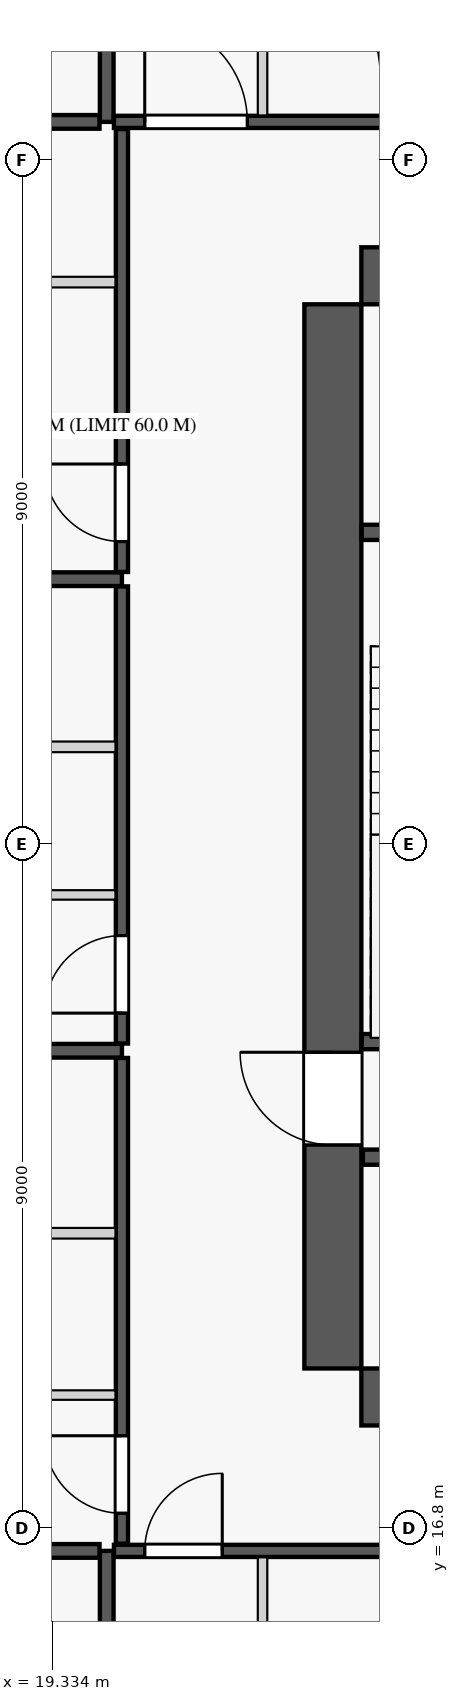
"""IFC4 building model, lengths in metres.
Left out: names, types, materials, properties, quantities, classifications, styles, units other than length and angle.
Written with IfcOpenShell. Run it as: python <this file> out.ifc"""

import sys

from ifc_helpers import new_model, si_unit, direction, frame, frame_2d, origin, origin_2d, place, context, subcontext, project, spatial, rectangle, extrude, element, fill, save


model = new_model("IFC4")
c1 = context("Model", 3, precision=1e-05, world=origin(), true_north=direction((0.0, 1.0)))
c2 = subcontext(c1, "Body", "Model", "MODEL_VIEW")
j1 = project(units=[si_unit("LENGTHUNIT", "METRE"), si_unit("PLANEANGLEUNIT", "RADIAN")], contexts=[c1])
p1 = place(None, origin())
s1 = spatial("IfcSite", under=j1, at=p1, CompositionType="ELEMENT")
p2 = place(p1, origin())
s2 = spatial("IfcBuilding", under=s1, at=p2, CompositionType="ELEMENT")
p3 = place(p2, frame((0.0, 0.0, 112.6)))
s3 = spatial("IfcBuildingStorey", under=s2, at=p3, CompositionType="ELEMENT", Elevation=112.6)
for number, where, z_axis, x_axis in (
    (1, (23.025, 18.525, 0.0), (0.0, 0.0, 1.0), (1.0, 0.0, 0.0)),
    (2, (23.025, 33.275, 0.0), (0.0, 0.0, 1.0), (1.0, 0.0, 0.0)),
):
    element("IfcColumn", number, at=place(p3, frame(where, z_axis=z_axis, x_axis=x_axis)), inside=s3, PredefinedType="COLUMN", context=c2, shape_type="SweptSolid", body=[
        extrude(rectangle(XDim=0.75, YDim=0.75, at=origin_2d()), origin(), (0.0, 0.0, 1.0), 3.55),
    ])
for number, where, z_axis, x_axis in (
    (3, (23.4, 18.525, 0.0), (0.0, 0.0, 1.0), (1.0, 0.0, 0.0)),
    (4, (23.4, 33.275, 0.0), (0.0, 0.0, 1.0), (1.0, 0.0, 0.0)),
):
    element("IfcWall", number, at=place(p3, frame(where, z_axis=z_axis, x_axis=x_axis)), inside=s3, PredefinedType="SHEAR", context=c2, shape_type="SweptSolid", body=[
        extrude(rectangle(XDim=18.0, YDim=0.75, at=frame_2d((9.0, 0.0))), origin(), (0.0, 0.0, 1.0), 3.34),
    ])
p4 = place(p3, frame((23.025, 18.9, 0.0), z_axis=(0.0, 0.0, 1.0), x_axis=(0.0, 1.0, 0.0)))
e5 = element("IfcWall", 5, at=p4, inside=s3, PredefinedType="SHEAR", context=c2, shape_type="SweptSolid", body=[
    extrude(rectangle(XDim=14.0, YDim=0.75, at=frame_2d((7.0, 0.0))), origin(), (0.0, 0.0, 1.0), 3.34),
])
p5 = place(p4, frame((2.94, 0.0, 0.0)))
e6 = element("IfcOpeningElement", 6, at=p5, cuts=e5, PredefinedType="OPENING", context=c2, shape_type="SweptSolid", body=[
    extrude(rectangle(XDim=1.22, YDim=2.25, at=frame_2d((0.61, 1.125))), frame((0.0, 0.385, 0.0), z_axis=(0.0, -1.0, 0.0), x_axis=(1.0, 0.0, 0.0)), (0.0, 0.0, 1.0), 0.77),
])
p6 = place(p3, frame((23.405, 23.2, 0.0), z_axis=(0.0, 0.0, 1.0), x_axis=(1.0, 0.0, 0.0)))
e7 = element("IfcWall", 7, at=p6, inside=s3, PredefinedType="PLUMBINGWALL", context=c2, shape_type="SweptSolid", body=[
    extrude(rectangle(XDim=3.27, YDim=0.2, at=frame_2d((1.635, 0.0))), origin(), (0.0, 0.0, 1.0), 3.34),
])
p7 = place(p3, frame((23.405, 29.9, 0.0), z_axis=(0.0, 0.0, 1.0), x_axis=(1.0, 0.0, 0.0)))
e8 = element("IfcWall", 8, at=p7, inside=s3, PredefinedType="PLUMBINGWALL", context=c2, shape_type="SweptSolid", body=[
    extrude(rectangle(XDim=3.27, YDim=0.2, at=frame_2d((1.635, 0.0))), origin(), (0.0, 0.0, 1.0), 3.34),
])
p8 = place(p7, frame((1.85, 0.0, 0.0)))
e9 = element("IfcOpeningElement", 9, at=p8, cuts=e8, PredefinedType="OPENING", context=c2, shape_type="SweptSolid", body=[
    extrude(rectangle(XDim=0.85, YDim=2.05, at=frame_2d((0.425, 1.025))), frame((0.0, 0.11, 0.0), z_axis=(0.0, -1.0, 0.0), x_axis=(1.0, 0.0, 0.0)), (0.0, 0.0, 1.0), 0.22),
])
p9 = place(p3, frame((23.42, 21.68, 0.0), z_axis=(0.0, 0.0, 1.0), x_axis=(1.0, 0.0, 0.0)))
e10 = element("IfcWall", 10, at=p9, inside=s3, PredefinedType="PLUMBINGWALL", context=c2, shape_type="SweptSolid", body=[
    extrude(rectangle(XDim=17.96, YDim=0.2, at=frame_2d((8.98, 0.0))), origin(), (0.0, 0.0, 1.0), 3.34),
])
p10 = place(p9, frame((11.6, 0.0, 0.0)))
e11 = element("IfcOpeningElement", 11, at=p10, cuts=e10, PredefinedType="OPENING", context=c2, shape_type="SweptSolid", body=[
    extrude(rectangle(XDim=1.1, YDim=2.2, at=frame_2d((0.55, 1.1))), frame((0.0, 0.11, 0.0), z_axis=(0.0, -1.0, 0.0), x_axis=(1.0, 0.0, 0.0)), (0.0, 0.0, 1.0), 0.22),
])
p11 = place(p9, frame((0.41, 0.0, 0.0)))
e12 = element("IfcOpeningElement", 12, at=p11, cuts=e10, PredefinedType="OPENING", context=c2, shape_type="SweptSolid", body=[
    extrude(rectangle(XDim=0.85, YDim=2.05, at=frame_2d((0.425, 1.025))), frame((0.0, 0.11, 0.0), z_axis=(0.0, -1.0, 0.0), x_axis=(1.0, 0.0, 0.0)), (0.0, 0.0, 1.0), 0.22),
])
p12 = place(p9, frame((13.78, 0.0, 0.0)))
e13 = element("IfcOpeningElement", 13, at=p12, cuts=e10, PredefinedType="OPENING", context=c2, shape_type="SweptSolid", body=[
    extrude(rectangle(XDim=0.85, YDim=2.05, at=frame_2d((0.425, 1.025))), frame((0.0, 0.11, 0.0), z_axis=(0.0, -1.0, 0.0), x_axis=(1.0, 0.0, 0.0)), (0.0, 0.0, 1.0), 0.22),
])
p13 = place(p9, frame((16.13, 0.0, 0.0)))
e14 = element("IfcOpeningElement", 14, at=p13, cuts=e10, PredefinedType="OPENING", context=c2, shape_type="SweptSolid", body=[
    extrude(rectangle(XDim=0.85, YDim=2.05, at=frame_2d((0.425, 1.025))), frame((0.0, 0.11, 0.0), z_axis=(0.0, -1.0, 0.0), x_axis=(1.0, 0.0, 0.0)), (0.0, 0.0, 1.0), 0.22),
])
p14 = place(p3, frame((20.05, 4.105, 0.0), z_axis=(0.0, 0.0, 1.0), x_axis=(0.0, 1.0, 0.0)))
e15 = element("IfcWall", 15, at=p14, inside=s3, PredefinedType="PARTITIONING", context=c2, shape_type="SweptSolid", body=[
    extrude(rectangle(XDim=12.395, YDim=0.18, at=frame_2d((6.198, 0.0))), origin(), (0.0, 0.0, 1.0), 3.34),
])
p15 = place(p3, frame((20.145, 16.5, 0.0), z_axis=(0.0, 0.0, 1.0), x_axis=(1.0, 0.0, 0.0)))
e16 = element("IfcWall", 16, at=p15, inside=s3, PredefinedType="PARTITIONING", context=c2, shape_type="SweptSolid", body=[
    extrude(rectangle(XDim=8.328, YDim=0.16, at=frame_2d((4.164, 0.0))), origin(), (0.0, 0.0, 1.0), 3.34),
])
p16 = place(p15, frame((0.405, 0.0, 0.0)))
e17 = element("IfcOpeningElement", 17, at=p16, cuts=e16, PredefinedType="OPENING", context=c2, shape_type="SweptSolid", body=[
    extrude(rectangle(XDim=1.02, YDim=2.25, at=frame_2d((0.51, 1.125))), frame((0.0, 0.09, 0.0), z_axis=(0.0, -1.0, 0.0), x_axis=(1.0, 0.0, 0.0)), (0.0, 0.0, 1.0), 0.18),
])
p17 = place(p3, frame((22.1, 12.391, 0.0), z_axis=(0.0, 0.0, 1.0), x_axis=(0.0, 1.0, 0.0)))
e18 = element("IfcWall", 18, at=p17, inside=s3, PredefinedType="PARTITIONING", context=c2, shape_type="SweptSolid", body=[
    extrude(rectangle(XDim=4.024, YDim=0.125, at=frame_2d((2.012, 0.0))), origin(), (0.0, 0.0, 1.0), 2.722),
])
p18 = place(p3, frame((20.05, 35.3, 0.0), z_axis=(0.0, 0.0, 1.0), x_axis=(0.0, 1.0, 0.0)))
e19 = element("IfcWall", 19, at=p18, inside=s3, PredefinedType="PARTITIONING", context=c2, shape_type="SweptSolid", body=[
    extrude(rectangle(XDim=12.195, YDim=0.18, at=frame_2d((6.098, 0.0))), origin(), (0.0, 0.0, 1.0), 3.34),
])
p19 = place(p3, frame((20.145, 35.3, 0.0), z_axis=(0.0, 0.0, 1.0), x_axis=(1.0, 0.0, 0.0)))
e20 = element("IfcWall", 20, at=p19, inside=s3, PredefinedType="PARTITIONING", context=c2, shape_type="SweptSolid", body=[
    extrude(rectangle(XDim=24.51, YDim=0.16, at=frame_2d((12.255, 0.0))), origin(), (0.0, 0.0, 1.0), 3.34),
])
p20 = place(p19, frame((0.405, 0.0, 0.0)))
e21 = element("IfcOpeningElement", 21, at=p20, cuts=e20, PredefinedType="OPENING", context=c2, shape_type="SweptSolid", body=[
    extrude(rectangle(XDim=1.35, YDim=2.35, at=frame_2d((0.675, 1.175))), frame((0.0, 0.09, 0.0), z_axis=(0.0, -1.0, 0.0), x_axis=(1.0, 0.0, 0.0)), (0.0, 0.0, 1.0), 0.18),
])
p21 = place(p3, frame((22.1, 35.385, 0.0), z_axis=(0.0, 0.0, 1.0), x_axis=(0.0, 1.0, 0.0)))
e22 = element("IfcWall", 22, at=p21, inside=s3, PredefinedType="PARTITIONING", context=c2, shape_type="SweptSolid", body=[
    extrude(rectangle(XDim=6.395, YDim=0.125, at=frame_2d((3.198, 0.0))), origin(), (0.0, 0.0, 1.0), 2.722),
])
p22 = place(p3, frame((12.185, 16.5, 0.0), z_axis=(0.0, 0.0, 1.0), x_axis=(1.0, 0.0, 0.0)))
e23 = element("IfcWall", 23, at=p22, inside=s3, PredefinedType="PARTITIONING", context=c2, shape_type="SweptSolid", body=[
    extrude(rectangle(XDim=7.77, YDim=0.18, at=frame_2d((3.885, 0.0))), origin(), (0.0, 0.0, 1.0), 3.34),
])
p23 = place(p3, frame((12.286, 35.3, 0.0), z_axis=(0.0, 0.0, 1.0), x_axis=(1.0, 0.0, 0.0)))
e24 = element("IfcWall", 24, at=p23, inside=s3, PredefinedType="PARTITIONING", context=c2, shape_type="SweptSolid", body=[
    extrude(rectangle(XDim=7.669, YDim=0.18, at=frame_2d((3.834, 0.0))), origin(), (0.0, 0.0, 1.0), 3.34),
])
p24 = place(p3, frame((20.25, 16.595, 0.0), z_axis=(0.0, 0.0, 1.0), x_axis=(0.0, 1.0, 0.0)))
e25 = element("IfcWall", 25, at=p24, inside=s3, PredefinedType="PARTITIONING", context=c2, shape_type="SweptSolid", body=[
    extrude(rectangle(XDim=6.39, YDim=0.16, at=frame_2d((3.195, 0.0))), origin(), (0.0, 0.0, 1.0), 3.34),
])
p25 = place(p24, frame((0.4, 0.0, 0.0)))
e26 = element("IfcOpeningElement", 26, at=p25, cuts=e25, PredefinedType="OPENING", context=c2, shape_type="SweptSolid", body=[
    extrude(rectangle(XDim=1.02, YDim=2.25, at=frame_2d((0.51, 1.125))), frame((0.0, 0.09, 0.0), z_axis=(0.0, -1.0, 0.0), x_axis=(1.0, 0.0, 0.0)), (0.0, 0.0, 1.0), 0.18),
])
p26 = place(p3, frame((17.685, 18.55, 0.0), z_axis=(0.0, 0.0, 1.0), x_axis=(1.0, 0.0, 0.0)))
e27 = element("IfcWall", 27, at=p26, inside=s3, PredefinedType="PARTITIONING", context=c2, shape_type="SweptSolid", body=[
    extrude(rectangle(XDim=2.48, YDim=0.125, at=frame_2d((1.24, 0.0))), origin(), (0.0, 0.0, 1.0), 2.722),
])
p27 = place(p3, frame((17.685, 20.679, 0.0), z_axis=(0.0, 0.0, 1.0), x_axis=(1.0, 0.0, 0.0)))
e28 = element("IfcWall", 28, at=p27, inside=s3, PredefinedType="PLUMBINGWALL", context=c2, shape_type="SweptSolid", body=[
    extrude(rectangle(XDim=2.48, YDim=0.14, at=frame_2d((1.24, 0.0))), origin(), (0.0, 0.0, 1.0), 3.34),
])
p28 = place(p3, frame((8.856, 23.08, 0.0), z_axis=(0.0, 0.0, 1.0), x_axis=(1.0, 0.0, 0.0)))
e29 = element("IfcWall", 29, at=p28, inside=s3, PredefinedType="PARTITIONING", context=c2, shape_type="SweptSolid", body=[
    extrude(rectangle(XDim=11.394, YDim=0.18, at=frame_2d((5.697, 0.0))), origin(), (0.0, 0.0, 1.0), 3.34),
])
p29 = place(p3, frame((20.25, 23.175, 0.0), z_axis=(0.0, 0.0, 1.0), x_axis=(0.0, 1.0, 0.0)))
e30 = element("IfcWall", 30, at=p29, inside=s3, PredefinedType="PARTITIONING", context=c2, shape_type="SweptSolid", body=[
    extrude(rectangle(XDim=6.014, YDim=0.16, at=frame_2d((3.007, 0.0))), origin(), (0.0, 0.0, 1.0), 3.34),
])
p30 = place(p29, frame((0.4, 0.0, 0.0)))
e31 = element("IfcOpeningElement", 31, at=p30, cuts=e30, PredefinedType="OPENING", context=c2, shape_type="SweptSolid", body=[
    extrude(rectangle(XDim=1.02, YDim=2.25, at=frame_2d((0.51, 1.125))), frame((0.0, 0.09, 0.0), z_axis=(0.0, -1.0, 0.0), x_axis=(1.0, 0.0, 0.0)), (0.0, 0.0, 1.0), 0.18),
])
p31 = place(p3, frame((17.685, 25.13, 0.0), z_axis=(0.0, 0.0, 1.0), x_axis=(1.0, 0.0, 0.0)))
e32 = element("IfcWall", 32, at=p31, inside=s3, PredefinedType="PARTITIONING", context=c2, shape_type="SweptSolid", body=[
    extrude(rectangle(XDim=2.48, YDim=0.125, at=frame_2d((1.24, 0.0))), origin(), (0.0, 0.0, 1.0), 3.34),
])
p32 = place(p3, frame((17.685, 27.078, 0.0), z_axis=(0.0, 0.0, 1.0), x_axis=(1.0, 0.0, 0.0)))
e33 = element("IfcWall", 33, at=p32, inside=s3, PredefinedType="PLUMBINGWALL", context=c2, shape_type="SweptSolid", body=[
    extrude(rectangle(XDim=2.48, YDim=0.14, at=frame_2d((1.24, 0.0))), origin(), (0.0, 0.0, 1.0), 3.34),
])
p33 = place(p3, frame((9.242, 29.284, 0.0), z_axis=(0.0, 0.0, 1.0), x_axis=(1.0, 0.0, 0.0)))
e34 = element("IfcWall", 34, at=p33, inside=s3, PredefinedType="PARTITIONING", context=c2, shape_type="SweptSolid", body=[
    extrude(rectangle(XDim=11.008, YDim=0.18, at=frame_2d((5.504, 0.0))), origin(), (0.0, 0.0, 1.0), 3.34),
])
p34 = place(p3, frame((20.25, 29.379, 0.0), z_axis=(0.0, 0.0, 1.0), x_axis=(0.0, 1.0, 0.0)))
e35 = element("IfcWall", 35, at=p34, inside=s3, PredefinedType="PARTITIONING", context=c2, shape_type="SweptSolid", body=[
    extrude(rectangle(XDim=5.826, YDim=0.16, at=frame_2d((2.913, 0.0))), origin(), (0.0, 0.0, 1.0), 3.34),
])
p35 = place(p34, frame((0.4, 0.0, 0.0)))
e36 = element("IfcOpeningElement", 36, at=p35, cuts=e35, PredefinedType="OPENING", context=c2, shape_type="SweptSolid", body=[
    extrude(rectangle(XDim=1.02, YDim=2.25, at=frame_2d((0.51, 1.125))), frame((0.0, 0.09, 0.0), z_axis=(0.0, -1.0, 0.0), x_axis=(1.0, 0.0, 0.0)), (0.0, 0.0, 1.0), 0.18),
])
p36 = place(p3, frame((17.685, 31.334, 0.0), z_axis=(0.0, 0.0, 1.0), x_axis=(1.0, 0.0, 0.0)))
e37 = element("IfcWall", 37, at=p36, inside=s3, PredefinedType="PARTITIONING", context=c2, shape_type="SweptSolid", body=[
    extrude(rectangle(XDim=2.48, YDim=0.125, at=frame_2d((1.24, 0.0))), origin(), (0.0, 0.0, 1.0), 3.34),
])
p37 = place(p3, frame((17.685, 33.192, 0.0), z_axis=(0.0, 0.0, 1.0), x_axis=(1.0, 0.0, 0.0)))
e38 = element("IfcWall", 38, at=p37, inside=s3, PredefinedType="PLUMBINGWALL", context=c2, shape_type="SweptSolid", body=[
    extrude(rectangle(XDim=2.48, YDim=0.14, at=frame_2d((1.24, 0.0))), origin(), (0.0, 0.0, 1.0), 2.722),
])
p38 = place(p5, origin())
e39 = element("IfcDoor", 39, at=p38, inside=s3, OperationType="SINGLE_SWING_RIGHT", PredefinedType="DOOR", context=c2, shape_type="SweptSolid", body=[
    extrude(rectangle(XDim=1.22, YDim=2.25, at=frame_2d((0.61, 1.125))), frame((0.0, 0.025, 0.0), z_axis=(0.0, -1.0, 0.0), x_axis=(1.0, 0.0, 0.0)), (0.0, 0.0, 1.0), 0.05),
])
fill(e6, e39)
p39 = place(p16, origin())
e40 = element("IfcDoor", 40, at=p39, inside=s3, OperationType="SINGLE_SWING_RIGHT", PredefinedType="DOOR", context=c2, shape_type="SweptSolid", body=[
    extrude(rectangle(XDim=1.02, YDim=2.25, at=frame_2d((0.51, 1.125))), frame((0.0, 0.025, 0.0), z_axis=(0.0, -1.0, 0.0), x_axis=(1.0, 0.0, 0.0)), (0.0, 0.0, 1.0), 0.05),
])
fill(e17, e40)
p40 = place(p20, origin())
e41 = element("IfcDoor", 41, at=p40, inside=s3, OperationType="SINGLE_SWING_LEFT", PredefinedType="DOOR", context=c2, shape_type="SweptSolid", body=[
    extrude(rectangle(XDim=1.35, YDim=2.35, at=frame_2d((0.675, 1.175))), frame((0.0, 0.025, 0.0), z_axis=(0.0, -1.0, 0.0), x_axis=(1.0, 0.0, 0.0)), (0.0, 0.0, 1.0), 0.05),
])
fill(e21, e41)
p41 = place(p25, origin())
e42 = element("IfcDoor", 42, at=p41, inside=s3, OperationType="SINGLE_SWING_RIGHT", PredefinedType="DOOR", context=c2, shape_type="SweptSolid", body=[
    extrude(rectangle(XDim=1.02, YDim=2.25, at=frame_2d((0.51, 1.125))), frame((0.0, 0.025, 0.0), z_axis=(0.0, -1.0, 0.0), x_axis=(1.0, 0.0, 0.0)), (0.0, 0.0, 1.0), 0.05),
])
fill(e26, e42)
p42 = place(p30, origin())
e43 = element("IfcDoor", 43, at=p42, inside=s3, OperationType="SINGLE_SWING_LEFT", PredefinedType="DOOR", context=c2, shape_type="SweptSolid", body=[
    extrude(rectangle(XDim=1.02, YDim=2.25, at=frame_2d((0.51, 1.125))), frame((0.0, 0.025, 0.0), z_axis=(0.0, -1.0, 0.0), x_axis=(1.0, 0.0, 0.0)), (0.0, 0.0, 1.0), 0.05),
])
fill(e31, e43)
p43 = place(p35, origin())
e44 = element("IfcDoor", 44, at=p43, inside=s3, OperationType="SINGLE_SWING_RIGHT", PredefinedType="DOOR", context=c2, shape_type="SweptSolid", body=[
    extrude(rectangle(XDim=1.02, YDim=2.25, at=frame_2d((0.51, 1.125))), frame((0.0, 0.025, 0.0), z_axis=(0.0, -1.0, 0.0), x_axis=(1.0, 0.0, 0.0)), (0.0, 0.0, 1.0), 0.05),
])
fill(e36, e44)
save(model, sys.argv[1])
